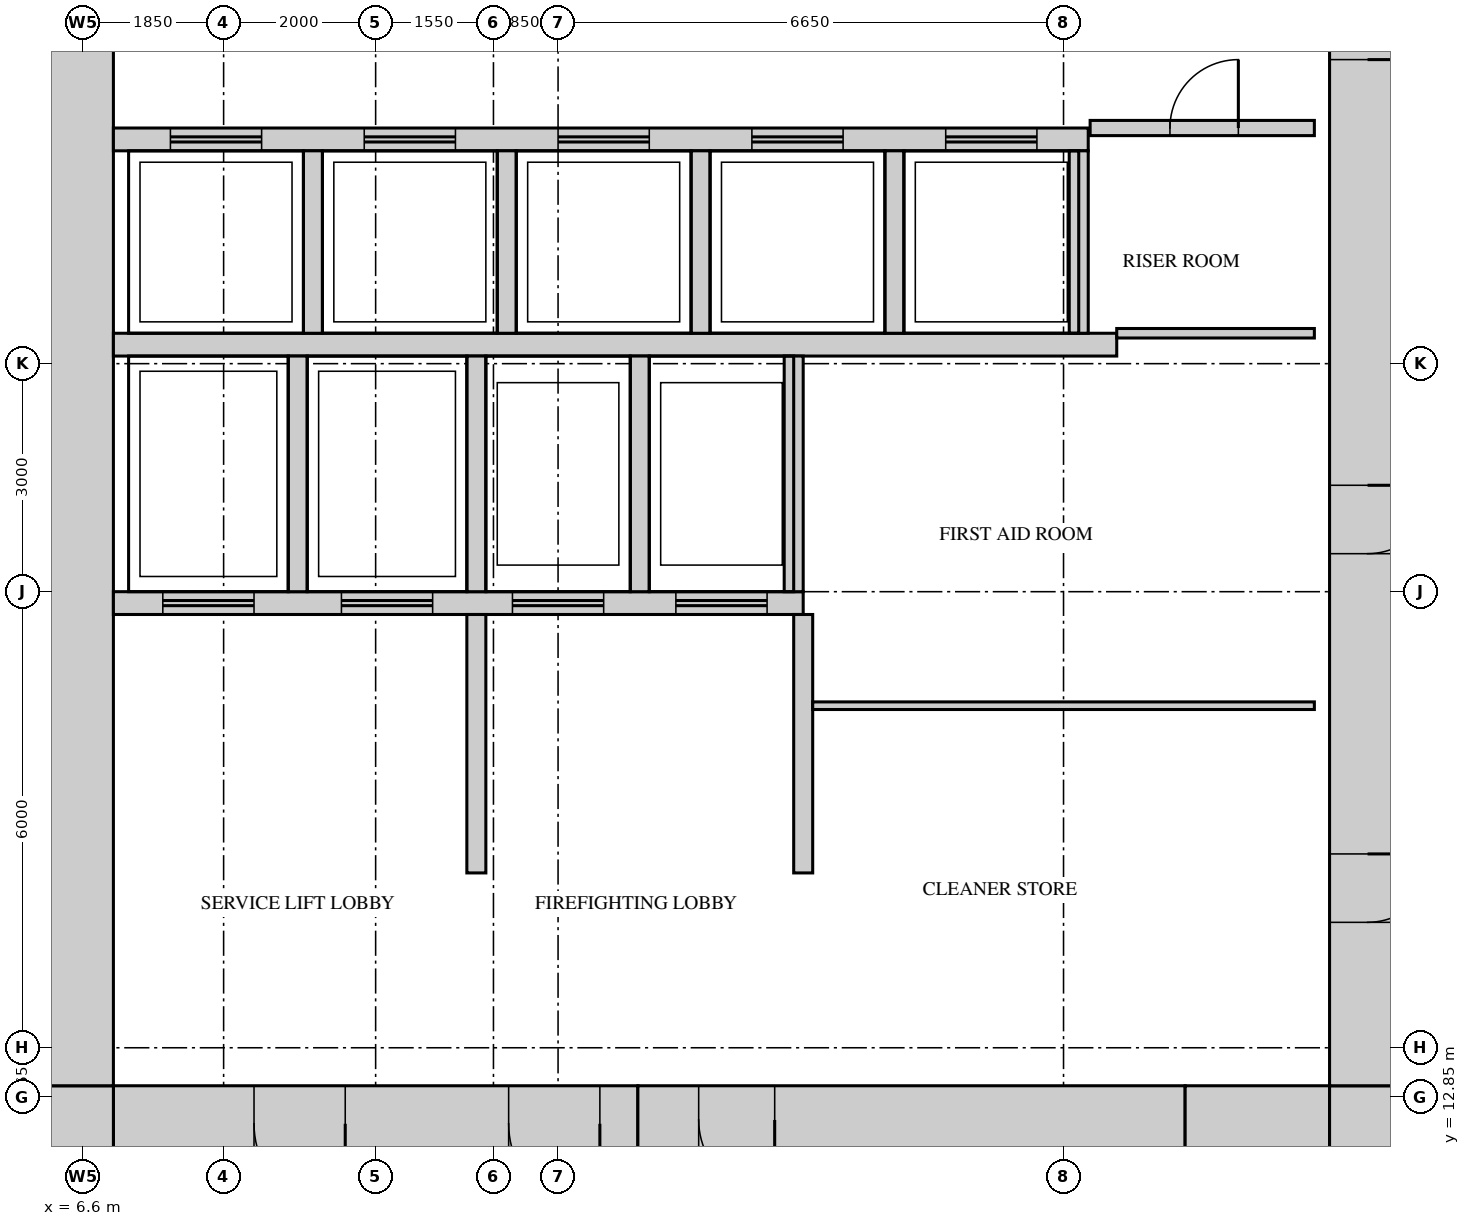
"""IFC4 building model, lengths in metres.
Left out: names, types, materials, properties, quantities, classifications, styles, units other than length and angle.
Written with IfcOpenShell. Run it as: python <this file> out.ifc"""

import sys

from ifc_helpers import new_model, si_unit, direction, frame, frame_2d, origin, place, context, subcontext, project, spatial, rectangle, extrude, source, transform, mapped, element, fill, save


model = new_model("IFC4")
c1 = context("Model", 3, precision=1e-05, world=origin(), true_north=direction((0.0, 1.0)))
c2 = subcontext(c1, "Body", "Model", "MODEL_VIEW")
j1 = project(units=[si_unit("LENGTHUNIT", "METRE"), si_unit("PLANEANGLEUNIT", "RADIAN")], contexts=[c1])
p1 = place(None, origin())
s1 = spatial("IfcSite", under=j1, at=p1, CompositionType="ELEMENT")
p2 = place(p1, origin())
s2 = spatial("IfcBuilding", under=s1, at=p2, CompositionType="ELEMENT")
p3 = place(p2, frame((0.0, 0.0, 158.7)))
s3 = spatial("IfcBuildingStorey", under=s2, at=p3, CompositionType="ELEMENT", Elevation=158.7)
m1 = source(origin(), c2, "Body", "SweptSolid", [
    extrude(rectangle(XDim=6.9, YDim=1.0, at=frame_2d((3.45, 0.0))), origin(), (0.0, 0.0, 1.0), 5.75),
])
p4 = place(p3, frame((7.0, 12.5, 0.0), z_axis=(0.0, 0.0, 1.0), x_axis=(1.0, 0.0, 0.0)))
e1 = element("IfcWall", 1, at=p4, inside=s3, PredefinedType="SHEAR", context=c2, shape_type="MappedRepresentation", body=[
    mapped(m1, transform((0.0, 0.0, 0.0))),
])
m2 = source(origin(), c2, "Body", "SweptSolid", [
    extrude(rectangle(XDim=1.2, YDim=2.1, at=frame_2d((0.6, 1.05))), frame((0.0, 0.51, 0.0), z_axis=(0.0, -1.0, 0.0), x_axis=(1.0, 0.0, 0.0)), (0.0, 0.0, 1.0), 1.02),
])
p5 = place(p4, frame((5.2, 0.0, 0.0)))
e2 = element("IfcOpeningElement", 2, at=p5, cuts=e1, PredefinedType="OPENING", context=c2, shape_type="MappedRepresentation", body=[
    mapped(m2, transform((0.0, 0.0, 0.0))),
])
p6 = place(p4, frame((1.85, 0.0, 0.0)))
e3 = element("IfcOpeningElement", 3, at=p6, cuts=e1, PredefinedType="OPENING", context=c2, shape_type="MappedRepresentation", body=[
    mapped(m2, transform((0.0, 0.0, 0.0))),
])
m3 = source(origin(), c2, "Body", "SweptSolid", [
    extrude(rectangle(XDim=7.2, YDim=0.9, at=frame_2d((3.6, 0.0))), origin(), (0.0, 0.0, 1.0), 5.75),
])
p7 = place(p3, frame((13.9, 12.55, 0.0), z_axis=(0.0, 0.0, 1.0), x_axis=(1.0, 0.0, 0.0)))
e4 = element("IfcWall", 4, at=p7, inside=s3, PredefinedType="SHEAR", context=c2, shape_type="MappedRepresentation", body=[
    mapped(m3, transform((0.0, 0.0, 0.0))),
])
m4 = source(origin(), c2, "Body", "SweptSolid", [
    extrude(rectangle(XDim=1.0, YDim=2.1, at=frame_2d((0.5, 1.05))), frame((0.0, 0.46, 0.0), z_axis=(0.0, -1.0, 0.0), x_axis=(1.0, 0.0, 0.0)), (0.0, 0.0, 1.0), 0.92),
])
p8 = place(p7, frame((0.8, 0.0, 0.0)))
e5 = element("IfcOpeningElement", 5, at=p8, cuts=e4, PredefinedType="OPENING", context=c2, shape_type="MappedRepresentation", body=[
    mapped(m4, transform((0.0, 0.0, 0.0))),
])
m5 = source(origin(), c2, "Body", "SweptSolid", [
    extrude(rectangle(XDim=1.9, YDim=1.0, at=frame_2d((0.95, 0.0))), origin(), (0.0, 0.0, 1.0), 5.75),
])
p9 = place(p3, frame((21.1, 12.5, 0.0), z_axis=(0.0, 0.0, 1.0), x_axis=(1.0, 0.0, 0.0)))
e6 = element("IfcWall", 6, at=p9, inside=s3, PredefinedType="SHEAR", context=c2, shape_type="MappedRepresentation", body=[
    mapped(m5, transform((0.0, 0.0, 0.0))),
])
m6 = source(origin(), c2, "Body", "SweptSolid", [
    extrude(rectangle(XDim=1.0, YDim=1.0, at=frame_2d((0.5, 0.0))), origin(), (0.0, 0.0, 1.0), 5.75),
])
for number, where, z_axis, x_axis in (
    (7, (23.0, 12.5, 0.0), (0.0, 0.0, 1.0), (1.0, 0.0, 0.0)),
    (8, (6.0, 12.5, 0.0), (0.0, 0.0, 1.0), (1.0, 0.0, 0.0)),
):
    element("IfcWall", number, at=place(p3, frame(where, z_axis=z_axis, x_axis=x_axis)), inside=s3, PredefinedType="SHEAR", context=c2, shape_type="MappedRepresentation", body=[
        mapped(m6, transform((0.0, 0.0, 0.0))),
    ])
m7 = source(origin(), c2, "Body", "SweptSolid", [
    extrude(rectangle(XDim=28.0, YDim=1.0, at=frame_2d((14.0, 0.0))), origin(), (0.0, 0.0, 1.0), 5.75),
])
p10 = place(p3, frame((23.5, 13.0, 0.0), z_axis=(0.0, 0.0, 1.0), x_axis=(0.0, 1.0, 0.0)))
e9 = element("IfcWall", 9, at=p10, inside=s3, PredefinedType="SHEAR", context=c2, shape_type="MappedRepresentation", body=[
    mapped(m7, transform((0.0, 0.0, 0.0))),
])
m8 = source(origin(), c2, "Body", "SweptSolid", [
    extrude(rectangle(XDim=1.8, YDim=2.1, at=frame_2d((0.9, 1.05))), frame((0.0, 0.51, 0.0), z_axis=(0.0, -1.0, 0.0), x_axis=(1.0, 0.0, 0.0)), (0.0, 0.0, 1.0), 1.02),
])
p11 = place(p10, frame((13.5, 0.0, 0.0)))
e10 = element("IfcOpeningElement", 10, at=p11, cuts=e9, PredefinedType="OPENING", context=c2, shape_type="MappedRepresentation", body=[
    mapped(m8, transform((0.0, 0.0, 0.0))),
])
p12 = place(p10, frame((22.6, 0.0, 0.0)))
e11 = element("IfcOpeningElement", 11, at=p12, cuts=e9, PredefinedType="OPENING", context=c2, shape_type="MappedRepresentation", body=[
    mapped(m8, transform((0.0, 0.0, 0.0))),
])
m9 = source(origin(), c2, "Body", "SweptSolid", [
    extrude(rectangle(XDim=0.9, YDim=2.1, at=frame_2d((0.45, 1.05))), frame((0.0, 0.51, 0.0), z_axis=(0.0, -1.0, 0.0), x_axis=(1.0, 0.0, 0.0)), (0.0, 0.0, 1.0), 1.02),
])
p13 = place(p10, frame((2.15, 0.0, 0.0)))
e12 = element("IfcOpeningElement", 12, at=p13, cuts=e9, PredefinedType="OPENING", context=c2, shape_type="MappedRepresentation", body=[
    mapped(m9, transform((0.0, 0.0, 0.0))),
])
p14 = place(p10, frame((7.0, 0.0, 0.0)))
e13 = element("IfcOpeningElement", 13, at=p14, cuts=e9, PredefinedType="OPENING", context=c2, shape_type="MappedRepresentation", body=[
    mapped(m9, transform((0.0, 0.0, 0.0))),
])
p15 = place(p3, frame((6.5, 13.0, 0.0), z_axis=(0.0, 0.0, 1.0), x_axis=(0.0, 1.0, 0.0)))
e14 = element("IfcWall", 14, at=p15, inside=s3, PredefinedType="SHEAR", context=c2, shape_type="MappedRepresentation", body=[
    mapped(m7, transform((0.0, 0.0, 0.0))),
])
m10 = source(origin(), c2, "Body", "SweptSolid", [
    extrude(rectangle(XDim=13.2, YDim=0.3, at=frame_2d((6.6, 0.0))), origin(), (0.0, 0.0, 1.0), 5.75),
])
p16 = place(p3, frame((7.0, 22.75, 0.0), z_axis=(0.0, 0.0, 1.0), x_axis=(1.0, 0.0, 0.0)))
e15 = element("IfcWall", 15, at=p16, inside=s3, PredefinedType="STANDARD", context=c2, shape_type="MappedRepresentation", body=[
    mapped(m10, transform((0.0, 0.0, 0.0))),
])
m11 = source(origin(), c2, "Body", "SweptSolid", [
    extrude(rectangle(XDim=9.075, YDim=0.3, at=frame_2d((4.538, 0.0))), origin(), (0.0, 0.0, 1.0), 5.75),
])
p17 = place(p3, frame((7.0, 19.35, 0.0), z_axis=(0.0, 0.0, 1.0), x_axis=(1.0, 0.0, 0.0)))
e16 = element("IfcWall", 16, at=p17, inside=s3, PredefinedType="STANDARD", context=c2, shape_type="MappedRepresentation", body=[
    mapped(m11, transform((0.0, 0.0, 0.0))),
])
m12 = source(origin(), c2, "Body", "SweptSolid", [
    extrude(rectangle(XDim=1.2, YDim=2.1, at=frame_2d((0.6, 1.05))), frame((0.0, 0.16, 0.0), z_axis=(0.0, -1.0, 0.0), x_axis=(1.0, 0.0, 0.0)), (0.0, 0.0, 1.0), 0.32),
])
p18 = place(p17, frame((0.65, 0.0, 0.0)))
e17 = element("IfcOpeningElement", 17, at=p18, cuts=e16, PredefinedType="OPENING", context=c2, shape_type="MappedRepresentation", body=[
    mapped(m12, transform((0.0, 0.0, 0.0))),
])
p19 = place(p17, frame((3.0, 0.0, 0.0)))
e18 = element("IfcOpeningElement", 18, at=p19, cuts=e16, PredefinedType="OPENING", context=c2, shape_type="MappedRepresentation", body=[
    mapped(m12, transform((0.0, 0.0, 0.0))),
])
p20 = place(p17, frame((5.25, 0.0, 0.0)))
e19 = element("IfcOpeningElement", 19, at=p20, cuts=e16, PredefinedType="OPENING", context=c2, shape_type="MappedRepresentation", body=[
    mapped(m12, transform((0.0, 0.0, 0.0))),
])
p21 = place(p17, frame((7.4, 0.0, 0.0)))
e20 = element("IfcOpeningElement", 20, at=p21, cuts=e16, PredefinedType="OPENING", context=c2, shape_type="MappedRepresentation", body=[
    mapped(m12, transform((0.0, 0.0, 0.0))),
])
m13 = source(origin(), c2, "Body", "SweptSolid", [
    extrude(rectangle(XDim=12.825, YDim=0.3, at=frame_2d((6.413, 0.0))), origin(), (0.0, 0.0, 1.0), 5.75),
])
p22 = place(p3, frame((7.0, 25.45, 0.0), z_axis=(0.0, 0.0, 1.0), x_axis=(1.0, 0.0, 0.0)))
e21 = element("IfcWall", 21, at=p22, inside=s3, PredefinedType="STANDARD", context=c2, shape_type="MappedRepresentation", body=[
    mapped(m13, transform((0.0, 0.0, 0.0))),
])
p23 = place(p22, frame((0.75, 0.0, 0.0)))
e22 = element("IfcOpeningElement", 22, at=p23, cuts=e21, PredefinedType="OPENING", context=c2, shape_type="MappedRepresentation", body=[
    mapped(m12, transform((0.0, 0.0, 0.0))),
])
p24 = place(p22, frame((3.3, 0.0, 0.0)))
e23 = element("IfcOpeningElement", 23, at=p24, cuts=e21, PredefinedType="OPENING", context=c2, shape_type="MappedRepresentation", body=[
    mapped(m12, transform((0.0, 0.0, 0.0))),
])
p25 = place(p22, frame((5.85, 0.0, 0.0)))
e24 = element("IfcOpeningElement", 24, at=p25, cuts=e21, PredefinedType="OPENING", context=c2, shape_type="MappedRepresentation", body=[
    mapped(m12, transform((0.0, 0.0, 0.0))),
])
p26 = place(p22, frame((8.4, 0.0, 0.0)))
e25 = element("IfcOpeningElement", 25, at=p26, cuts=e21, PredefinedType="OPENING", context=c2, shape_type="MappedRepresentation", body=[
    mapped(m12, transform((0.0, 0.0, 0.0))),
])
p27 = place(p22, frame((10.95, 0.0, 0.0)))
e26 = element("IfcOpeningElement", 26, at=p27, cuts=e21, PredefinedType="OPENING", context=c2, shape_type="MappedRepresentation", body=[
    mapped(m12, transform((0.0, 0.0, 0.0))),
])
m14 = source(origin(), c2, "Body", "SweptSolid", [
    extrude(rectangle(XDim=3.1, YDim=0.25, at=frame_2d((1.55, 0.0))), origin(), (0.0, 0.0, 1.0), 5.75),
])
for number, where, z_axis, x_axis in (
    (27, (9.425, 19.5, 0.0), (0.0, 0.0, 1.0), (0.0, 1.0, 0.0)),
    (28, (11.775, 19.5, 0.0), (0.0, 0.0, 1.0), (0.0, 1.0, 0.0)),
    (29, (13.925, 19.5, 0.0), (0.0, 0.0, 1.0), (0.0, 1.0, 0.0)),
    (30, (15.95, 19.5, 0.0), (0.0, 0.0, 1.0), (0.0, 1.0, 0.0)),
):
    element("IfcWall", number, at=place(p3, frame(where, z_axis=z_axis, x_axis=x_axis)), inside=s3, PredefinedType="STANDARD", context=c2, shape_type="MappedRepresentation", body=[
        mapped(m14, transform((0.0, 0.0, 0.0))),
    ])
m15 = source(origin(), c2, "Body", "SweptSolid", [
    extrude(rectangle(XDim=2.4, YDim=0.25, at=frame_2d((1.2, 0.0))), origin(), (0.0, 0.0, 1.0), 5.75),
])
for number, where, z_axis, x_axis in (
    (31, (17.275, 22.9, 0.0), (0.0, 0.0, 1.0), (0.0, 1.0, 0.0)),
    (32, (19.7, 22.9, 0.0), (0.0, 0.0, 1.0), (0.0, 1.0, 0.0)),
    (33, (9.625, 22.9, 0.0), (0.0, 0.0, 1.0), (0.0, 1.0, 0.0)),
    (34, (12.175, 22.9, 0.0), (0.0, 0.0, 1.0), (0.0, 1.0, 0.0)),
    (35, (14.725, 22.9, 0.0), (0.0, 0.0, 1.0), (0.0, 1.0, 0.0)),
):
    element("IfcWall", number, at=place(p3, frame(where, z_axis=z_axis, x_axis=x_axis)), inside=s3, PredefinedType="STANDARD", context=c2, shape_type="MappedRepresentation", body=[
        mapped(m15, transform((0.0, 0.0, 0.0))),
    ])
m16 = source(origin(), c2, "Body", "SweptSolid", [
    extrude(rectangle(XDim=3.4, YDim=0.25, at=frame_2d((1.7, 0.0))), origin(), (0.0, 0.0, 1.0), 5.75),
])
for number, where, z_axis, x_axis in (
    (36, (16.075, 15.8, 0.0), (0.0, 0.0, 1.0), (0.0, 1.0, 0.0)),
    (37, (11.775, 15.8, 0.0), (0.0, 0.0, 1.0), (0.0, 1.0, 0.0)),
):
    element("IfcWall", number, at=place(p3, frame(where, z_axis=z_axis, x_axis=x_axis)), inside=s3, PredefinedType="STANDARD", context=c2, shape_type="MappedRepresentation", body=[
        mapped(m16, transform((0.0, 0.0, 0.0))),
    ])
m17 = source(origin(), c2, "Body", "SweptSolid", [
    extrude(rectangle(XDim=6.6, YDim=0.1, at=frame_2d((3.3, 0.0))), origin(), (0.0, 0.0, 1.0), 5.75),
])
p28 = place(p3, frame((16.2, 18.0, 0.0), z_axis=(0.0, 0.0, 1.0), x_axis=(1.0, 0.0, 0.0)))
e38 = element("IfcWall", 38, at=p28, inside=s3, PredefinedType="PARTITIONING", context=c2, shape_type="MappedRepresentation", body=[
    mapped(m17, transform((0.0, 0.0, 0.0))),
])
m18 = source(origin(), c2, "Body", "SweptSolid", [
    extrude(rectangle(XDim=2.6, YDim=0.125, at=frame_2d((1.3, 0.0))), origin(), (0.0, 0.0, 1.0), 5.75),
])
p29 = place(p3, frame((20.2, 22.9, 0.0), z_axis=(0.0, 0.0, 1.0), x_axis=(1.0, 0.0, 0.0)))
e39 = element("IfcWall", 39, at=p29, inside=s3, PredefinedType="PARTITIONING", context=c2, shape_type="MappedRepresentation", body=[
    mapped(m18, transform((0.0, 0.0, 0.0))),
])
m19 = source(origin(), c2, "Body", "SweptSolid", [
    extrude(rectangle(XDim=2.95, YDim=0.2, at=frame_2d((1.475, 0.0))), origin(), (0.0, 0.0, 1.0), 5.75),
])
p30 = place(p3, frame((19.85, 25.6, 0.0), z_axis=(0.0, 0.0, 1.0), x_axis=(1.0, 0.0, 0.0)))
e40 = element("IfcWall", 40, at=p30, inside=s3, PredefinedType="PARTITIONING", context=c2, shape_type="MappedRepresentation", body=[
    mapped(m19, transform((0.0, 0.0, 0.0))),
])
m20 = source(origin(), c2, "Body", "SweptSolid", [
    extrude(rectangle(XDim=0.9, YDim=2.1, at=frame_2d((0.45, 1.05))), frame((0.0, 0.11, 0.0), z_axis=(0.0, -1.0, 0.0), x_axis=(1.0, 0.0, 0.0)), (0.0, 0.0, 1.0), 0.22),
])
p31 = place(p30, frame((1.05, 0.0, 0.0)))
e41 = element("IfcOpeningElement", 41, at=p31, cuts=e40, PredefinedType="OPENING", context=c2, shape_type="MappedRepresentation", body=[
    mapped(m20, transform((0.0, 0.0, 0.0))),
])
m21 = source(origin(), c2, "Body", "SweptSolid", [
    extrude(rectangle(XDim=1.8, YDim=2.1, at=frame_2d((0.9, 1.05))), frame((0.0, 0.45, 0.0), z_axis=(0.0, -1.0, 0.0), x_axis=(1.0, 0.0, 0.0)), (0.0, 0.0, 1.0), 0.9),
])
p32 = place(p11, origin())
e42 = element("IfcDoor", 42, at=p32, inside=s3, OperationType="DOUBLE_DOOR_SINGLE_SWING", PredefinedType="DOOR", context=c2, shape_type="MappedRepresentation", body=[
    mapped(m21, transform((0.0, 0.0, 0.0))),
])
fill(e10, e42)
m22 = source(origin(), c2, "Body", "SweptSolid", [
    extrude(rectangle(XDim=0.9, YDim=2.1, at=frame_2d((0.45, 1.05))), frame((0.0, 0.025, 0.0), z_axis=(0.0, -1.0, 0.0), x_axis=(1.0, 0.0, 0.0)), (0.0, 0.0, 1.0), 0.05),
])
p33 = place(p31, origin())
e43 = element("IfcDoor", 43, at=p33, inside=s3, OperationType="SINGLE_SWING_LEFT", PredefinedType="DOOR", context=c2, shape_type="MappedRepresentation", body=[
    mapped(m22, transform((0.0, 0.0, 0.0))),
])
fill(e41, e43)
m23 = source(origin(), c2, "Body", "SweptSolid", [
    extrude(rectangle(XDim=0.9, YDim=2.1, at=frame_2d((0.45, 1.05))), frame((0.0, 0.45, 0.0), z_axis=(0.0, -1.0, 0.0), x_axis=(1.0, 0.0, 0.0)), (0.0, 0.0, 1.0), 0.9),
])
p34 = place(p13, origin())
e44 = element("IfcDoor", 44, at=p34, inside=s3, OperationType="SINGLE_SWING_RIGHT", PredefinedType="DOOR", context=c2, shape_type="MappedRepresentation", body=[
    mapped(m23, transform((0.0, 0.0, 0.0))),
])
fill(e12, e44)
p35 = place(p14, origin())
e45 = element("IfcDoor", 45, at=p35, inside=s3, OperationType="SINGLE_SWING_RIGHT", PredefinedType="DOOR", context=c2, shape_type="MappedRepresentation", body=[
    mapped(m23, transform((0.0, 0.0, 0.0))),
])
fill(e13, e45)
m24 = source(origin(), c2, "Body", "SweptSolid", [
    extrude(rectangle(XDim=1.2, YDim=2.1, at=frame_2d((0.6, 1.05))), frame((0.0, 0.45, 0.0), z_axis=(0.0, -1.0, 0.0), x_axis=(1.0, 0.0, 0.0)), (0.0, 0.0, 1.0), 0.9),
])
p36 = place(p5, origin())
e46 = element("IfcDoor", 46, at=p36, inside=s3, OperationType="SINGLE_SWING_RIGHT", PredefinedType="DOOR", context=c2, shape_type="MappedRepresentation", body=[
    mapped(m24, transform((0.0, 0.0, 0.0))),
])
fill(e2, e46)
p37 = place(p6, origin())
e47 = element("IfcDoor", 47, at=p37, inside=s3, OperationType="SINGLE_SWING_RIGHT", PredefinedType="DOOR", context=c2, shape_type="MappedRepresentation", body=[
    mapped(m24, transform((0.0, 0.0, 0.0))),
])
fill(e3, e47)
m25 = source(origin(), c2, "Body", "SweptSolid", [
    extrude(rectangle(XDim=1.0, YDim=2.1, at=frame_2d((0.5, 1.05))), frame((0.0, 0.4, 0.0), z_axis=(0.0, -1.0, 0.0), x_axis=(1.0, 0.0, 0.0)), (0.0, 0.0, 1.0), 0.8),
])
p38 = place(p8, origin())
e48 = element("IfcDoor", 48, at=p38, inside=s3, OperationType="SINGLE_SWING_RIGHT", PredefinedType="DOOR", context=c2, shape_type="MappedRepresentation", body=[
    mapped(m25, transform((0.0, 0.0, 0.0))),
])
fill(e5, e48)
m26 = source(origin(), c2, "Body", "SweptSolid", [
    extrude(rectangle(XDim=1.2, YDim=2.1, at=frame_2d((0.6, 1.05))), frame((0.0, 0.025, 0.0), z_axis=(0.0, -1.0, 0.0), x_axis=(1.0, 0.0, 0.0)), (0.0, 0.0, 1.0), 0.05),
])
p39 = place(p23, origin())
e49 = element("IfcDoor", 49, at=p39, inside=s3, OperationType="DOUBLE_DOOR_SLIDING", PredefinedType="DOOR", context=c2, shape_type="MappedRepresentation", body=[
    mapped(m26, transform((0.0, 0.0, 0.0))),
])
fill(e22, e49)
p40 = place(p24, origin())
e50 = element("IfcDoor", 50, at=p40, inside=s3, OperationType="DOUBLE_DOOR_SLIDING", PredefinedType="DOOR", context=c2, shape_type="MappedRepresentation", body=[
    mapped(m26, transform((0.0, 0.0, 0.0))),
])
fill(e23, e50)
p41 = place(p25, origin())
e51 = element("IfcDoor", 51, at=p41, inside=s3, OperationType="DOUBLE_DOOR_SLIDING", PredefinedType="DOOR", context=c2, shape_type="MappedRepresentation", body=[
    mapped(m26, transform((0.0, 0.0, 0.0))),
])
fill(e24, e51)
p42 = place(p26, origin())
e52 = element("IfcDoor", 52, at=p42, inside=s3, OperationType="DOUBLE_DOOR_SLIDING", PredefinedType="DOOR", context=c2, shape_type="MappedRepresentation", body=[
    mapped(m26, transform((0.0, 0.0, 0.0))),
])
fill(e25, e52)
p43 = place(p27, origin())
e53 = element("IfcDoor", 53, at=p43, inside=s3, OperationType="DOUBLE_DOOR_SLIDING", PredefinedType="DOOR", context=c2, shape_type="MappedRepresentation", body=[
    mapped(m26, transform((0.0, 0.0, 0.0))),
])
fill(e26, e53)
p44 = place(p18, origin())
e54 = element("IfcDoor", 54, at=p44, inside=s3, OperationType="DOUBLE_DOOR_SLIDING", PredefinedType="DOOR", context=c2, shape_type="MappedRepresentation", body=[
    mapped(m26, transform((0.0, 0.0, 0.0))),
])
fill(e17, e54)
p45 = place(p19, origin())
e55 = element("IfcDoor", 55, at=p45, inside=s3, OperationType="DOUBLE_DOOR_SLIDING", PredefinedType="DOOR", context=c2, shape_type="MappedRepresentation", body=[
    mapped(m26, transform((0.0, 0.0, 0.0))),
])
fill(e18, e55)
p46 = place(p20, origin())
e56 = element("IfcDoor", 56, at=p46, inside=s3, OperationType="DOUBLE_DOOR_SLIDING", PredefinedType="DOOR", context=c2, shape_type="MappedRepresentation", body=[
    mapped(m26, transform((0.0, 0.0, 0.0))),
])
fill(e19, e56)
p47 = place(p21, origin())
e57 = element("IfcDoor", 57, at=p47, inside=s3, OperationType="DOUBLE_DOOR_SLIDING", PredefinedType="DOOR", context=c2, shape_type="MappedRepresentation", body=[
    mapped(m26, transform((0.0, 0.0, 0.0))),
])
fill(e20, e57)
save(model, sys.argv[1])
